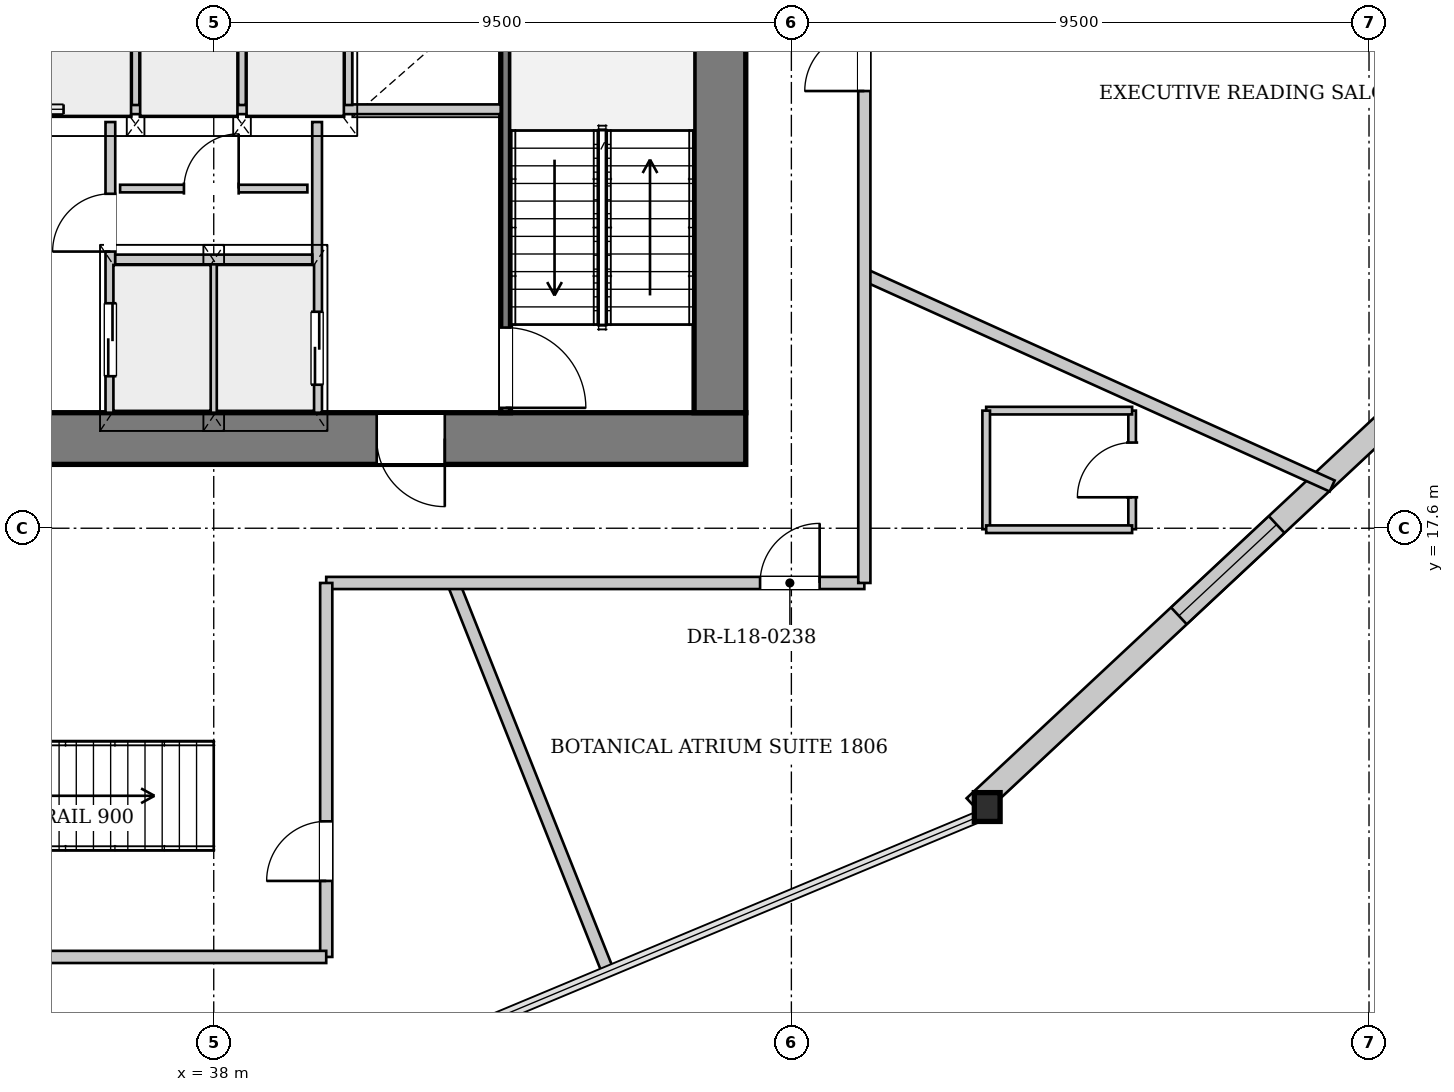
"""IFC4 building model, lengths in metres.
Left out: names, types, materials, properties, quantities, classifications, styles, units other than length and angle.
Written with IfcOpenShell. Run it as: python <this file> out.ifc"""

import sys

from ifc_helpers import new_model, si_unit, direction, frame, frame_2d, origin, origin_2d, place, context, subcontext, project, spatial, rectangle, i_section, extrude, source, transform, mapped, element, fill, save


model = new_model("IFC4")
c1 = context("Model", 3, precision=1e-05, world=origin(), true_north=direction((0.0, 1.0)))
c2 = subcontext(c1, "Body", "Model", "MODEL_VIEW")
j1 = project(units=[si_unit("LENGTHUNIT", "METRE"), si_unit("PLANEANGLEUNIT", "RADIAN")], contexts=[c1])
p1 = place(None, origin())
s1 = spatial("IfcSite", under=j1, at=p1, CompositionType="ELEMENT")
p2 = place(p1, origin())
s2 = spatial("IfcBuilding", under=s1, at=p2, CompositionType="ELEMENT")
p3 = place(p2, frame((0.0, 0.0, 71.9)))
s3 = spatial("IfcBuildingStorey", under=s2, at=p3, CompositionType="ELEMENT", Elevation=71.9)
m1 = source(origin(), c2, "Body", "SweptSolid", [
    extrude(i_section(OverallWidth=0.424, OverallDepth=0.474, WebThickness=0.043, FlangeThickness=0.068, at=origin_2d()), origin(), (0.0, 0.0, 1.0), 3.848),
])
p4 = place(p3, frame((50.641, 12.882, 0.0), z_axis=(0.041559344662, 0.069350173611, 0.996726328684), x_axis=(-0.857769784319, 0.514034042753, 0.0)))
e1 = element("IfcColumn", 1, at=p4, inside=s3, PredefinedType="COLUMN", context=c2, shape_type="MappedRepresentation", body=[
    mapped(m1, transform((0.0, 0.0, 0.0), x_axis=(1.0, 0.0, 0.0), y_axis=(0.0, 1.0, 0.0), z_axis=(0.0, 0.0, 1.0), scale=1.0)),
])
p5 = place(p3, frame((68.261, 29.594, 0.0), z_axis=(0.0, 0.0, 1.0), x_axis=(-0.730910825088, -0.682472978051, 0.0)))
e2 = element("IfcWall", 2, at=p5, inside=s3, PredefinedType="SOLIDWALL", context=c2, shape_type="SweptSolid", body=[
    extrude(rectangle(XDim=24.284, YDim=0.38, at=frame_2d((12.142, 0.0))), origin(), (0.0, 0.0, 1.0), 3.042),
])
p6 = place(p5, frame((5.7, 0.0, 0.65)))
e3 = element("IfcOpeningElement", 3, at=p6, cuts=e2, PredefinedType="OPENING", context=c2, shape_type="SweptSolid", body=[
    extrude(rectangle(XDim=2.2, YDim=2.25, at=frame_2d((1.1, 1.125))), frame((0.0, 0.2, 0.0), z_axis=(0.0, -1.0, 0.0), x_axis=(1.0, 0.0, 0.0)), (0.0, 0.0, 1.0), 0.4),
])
p7 = place(p5, frame((17.485, 0.0, 0.65)))
e4 = element("IfcOpeningElement", 4, at=p7, cuts=e2, PredefinedType="OPENING", context=c2, shape_type="SweptSolid", body=[
    extrude(rectangle(XDim=2.2, YDim=2.25, at=frame_2d((1.1, 1.125))), frame((0.0, 0.2, 0.0), z_axis=(0.0, -1.0, 0.0), x_axis=(1.0, 0.0, 0.0)), (0.0, 0.0, 1.0), 0.4),
])
p8 = place(p3, frame((46.75, 19.075, 0.0), z_axis=(0.0, 0.0, 1.0), x_axis=(-1.0, 0.0, 0.0)))
e5 = element("IfcWall", 5, at=p8, inside=s3, PredefinedType="SHEAR", context=c2, shape_type="SweptSolid", body=[
    extrude(rectangle(XDim=17.5, YDim=0.85, at=frame_2d((8.75, 0.0))), origin(), (0.0, 0.0, 1.0), 3.75),
])
p9 = place(p8, frame((4.95, 0.0, 0.0)))
e6 = element("IfcOpeningElement", 6, at=p9, cuts=e5, PredefinedType="OPENING", context=c2, shape_type="SweptSolid", body=[
    extrude(rectangle(XDim=1.12, YDim=2.25, at=frame_2d((0.56, 1.125))), frame((0.0, 0.435, 0.0), z_axis=(0.0, -1.0, 0.0), x_axis=(1.0, 0.0, 0.0)), (0.0, 0.0, 1.0), 0.87),
])
p10 = place(p8, frame((11.45, 0.0, 0.0)))
e7 = element("IfcOpeningElement", 7, at=p10, cuts=e5, PredefinedType="OPENING", context=c2, shape_type="SweptSolid", body=[
    extrude(rectangle(XDim=1.12, YDim=2.25, at=frame_2d((0.56, 1.125))), frame((0.0, 0.435, 0.0), z_axis=(0.0, -1.0, 0.0), x_axis=(1.0, 0.0, 0.0)), (0.0, 0.0, 1.0), 0.87),
])
p11 = place(p3, frame((46.325, 33.7, 0.0), z_axis=(0.0, 0.0, 1.0), x_axis=(0.0, -1.0, 0.0)))
e8 = element("IfcWall", 8, at=p11, inside=s3, PredefinedType="SHEAR", context=c2, shape_type="SweptSolid", body=[
    extrude(rectangle(XDim=14.2, YDim=0.85, at=frame_2d((7.1, 0.0))), origin(), (0.0, 0.0, 1.0), 3.75),
])
p12 = place(p11, frame((5.18, 0.0, 0.0)))
e9 = element("IfcOpeningElement", 9, at=p12, cuts=e8, PredefinedType="OPENING", context=c2, shape_type="SweptSolid", body=[
    extrude(rectangle(XDim=1.6, YDim=2.2, at=frame_2d((0.8, 1.1))), frame((0.0, 0.435, 0.0), z_axis=(0.0, -1.0, 0.0), x_axis=(1.0, 0.0, 0.0)), (0.0, 0.0, 1.0), 0.87),
])
p13 = place(p3, frame((42.8, 26.96, 0.0), z_axis=(0.0, 0.0, 1.0), x_axis=(0.0, -1.0, 0.0)))
e10 = element("IfcWall", 10, at=p13, inside=s3, PredefinedType="PARTITIONING", context=c2, shape_type="SweptSolid", body=[
    extrude(rectangle(XDim=7.46, YDim=0.16, at=frame_2d((3.73, 0.0))), origin(), (0.0, 0.0, 1.0), 3.75),
])
p14 = place(p13, frame((6.06, 0.0, 0.0)))
e11 = element("IfcOpeningElement", 11, at=p14, cuts=e10, PredefinedType="OPENING", context=c2, shape_type="SweptSolid", body=[
    extrude(rectangle(XDim=1.32, YDim=2.2, at=frame_2d((0.66, 1.1))), frame((0.0, 0.09, 0.0), z_axis=(0.0, -1.0, 0.0), x_axis=(1.0, 0.0, 0.0)), (0.0, 0.0, 1.0), 0.18),
])
p15 = place(p3, frame((36.3, 19.5, 0.0), z_axis=(0.0, 0.0, 1.0), x_axis=(0.0, 1.0, 0.0)))
e12 = element("IfcWall", 12, at=p15, inside=s3, PredefinedType="PARTITIONING", context=c2, shape_type="SweptSolid", body=[
    extrude(rectangle(XDim=4.78, YDim=0.16, at=frame_2d((2.39, 0.0))), origin(), (0.0, 0.0, 1.0), 3.75),
])
p16 = place(p15, frame((0.6, 0.0, 0.0)))
e13 = element("IfcOpeningElement", 13, at=p16, cuts=e12, PredefinedType="OPENING", context=c2, shape_type="SweptSolid", body=[
    extrude(rectangle(XDim=1.2, YDim=2.2, at=frame_2d((0.6, 1.1))), frame((0.0, 0.09, 0.0), z_axis=(0.0, -1.0, 0.0), x_axis=(1.0, 0.0, 0.0)), (0.0, 0.0, 1.0), 0.18),
])
p17 = place(p15, frame((2.65, 0.0, 0.0)))
e14 = element("IfcOpeningElement", 14, at=p17, cuts=e12, PredefinedType="OPENING", context=c2, shape_type="SweptSolid", body=[
    extrude(rectangle(XDim=0.95, YDim=2.1, at=frame_2d((0.475, 1.05))), frame((0.0, 0.09, 0.0), z_axis=(0.0, -1.0, 0.0), x_axis=(1.0, 0.0, 0.0)), (0.0, 0.0, 1.0), 0.18),
])
p18 = place(p3, frame((39.7, 24.28, 0.0), z_axis=(0.0, 0.0, 1.0), x_axis=(0.0, -1.0, 0.0)))
e15 = element("IfcWall", 15, at=p18, inside=s3, PredefinedType="PARTITIONING", context=c2, shape_type="SweptSolid", body=[
    extrude(rectangle(XDim=4.78, YDim=0.16, at=frame_2d((2.39, 0.0))), origin(), (0.0, 0.0, 1.0), 3.75),
])
p19 = place(p18, frame((3.12, 0.0, 0.0)))
e16 = element("IfcOpeningElement", 16, at=p19, cuts=e15, PredefinedType="OPENING", context=c2, shape_type="SweptSolid", body=[
    extrude(rectangle(XDim=1.2, YDim=2.2, at=frame_2d((0.6, 1.1))), frame((0.0, 0.09, 0.0), z_axis=(0.0, -1.0, 0.0), x_axis=(1.0, 0.0, 0.0)), (0.0, 0.0, 1.0), 0.18),
])
p20 = place(p3, frame((38.0, 19.5, 0.0), z_axis=(0.0, 0.0, 1.0), x_axis=(0.0, 1.0, 0.0)))
e17 = element("IfcWall", 17, at=p20, inside=s3, PredefinedType="PARTITIONING", context=c2, shape_type="SweptSolid", body=[
    extrude(rectangle(XDim=2.46, YDim=0.125, at=frame_2d((1.23, 0.0))), origin(), (0.0, 0.0, 1.0), 3.75),
])
p21 = place(p3, frame((36.38, 22.02, 0.0), z_axis=(0.0, 0.0, 1.0), x_axis=(1.0, 0.0, 0.0)))
e18 = element("IfcWall", 18, at=p21, inside=s3, PredefinedType="PARTITIONING", context=c2, shape_type="SweptSolid", body=[
    extrude(rectangle(XDim=3.24, YDim=0.16, at=frame_2d((1.62, 0.0))), origin(), (0.0, 0.0, 1.0), 3.75),
])
p22 = place(p3, frame((33.28, 24.49, 0.0), z_axis=(0.0, 0.0, 1.0), x_axis=(1.0, 0.0, 0.0)))
e19 = element("IfcWall", 19, at=p22, inside=s3, PredefinedType="PARTITIONING", context=c2, shape_type="SweptSolid", body=[
    extrude(rectangle(XDim=9.44, YDim=0.16, at=frame_2d((4.72, 0.0))), origin(), (0.0, 0.0, 1.0), 3.75),
])
p23 = place(p22, frame((0.85, 0.0, 0.95)))
e20 = element("IfcOpeningElement", 20, at=p23, cuts=e19, PredefinedType="OPENING", context=c2, shape_type="SweptSolid", body=[
    extrude(rectangle(XDim=1.4, YDim=1.8, at=frame_2d((0.7, 0.9))), frame((0.0, 0.09, 0.0), z_axis=(0.0, -1.0, 0.0), x_axis=(1.0, 0.0, 0.0)), (0.0, 0.0, 1.0), 0.18),
])
p24 = place(p3, frame((36.46, 23.186, 0.0), z_axis=(0.0, 0.0, 1.0), x_axis=(1.0, 0.0, 0.0)))
e21 = element("IfcWall", 21, at=p24, inside=s3, PredefinedType="PARTITIONING", context=c2, shape_type="SweptSolid", body=[
    extrude(rectangle(XDim=3.08, YDim=0.125, at=frame_2d((1.54, 0.0))), origin(), (0.0, 0.0, 1.0), 3.75),
])
p25 = place(p24, frame((1.05, 0.0, 0.0)))
e22 = element("IfcOpeningElement", 22, at=p25, cuts=e21, PredefinedType="OPENING", context=c2, shape_type="SweptSolid", body=[
    extrude(rectangle(XDim=0.9, YDim=2.1, at=frame_2d((0.45, 1.05))), frame((0.0, 0.073, 0.0), z_axis=(0.0, -1.0, 0.0), x_axis=(1.0, 0.0, 0.0)), (0.0, 0.0, 1.0), 0.145),
])
for number, where, z_axis, x_axis in (
    (23, (36.715, 24.56, 0.0), (0.0, 0.0, 1.0), (0.0, 1.0, 0.0)),
    (24, (38.465, 24.56, 0.0), (0.0, 0.0, 1.0), (0.0, 1.0, 0.0)),
    (25, (40.215, 24.56, 0.0), (0.0, 0.0, 1.0), (0.0, 1.0, 0.0)),
):
    element("IfcWall", number, at=place(p3, frame(where, z_axis=z_axis, x_axis=x_axis)), inside=s3, PredefinedType="PARTITIONING", context=c2, shape_type="SweptSolid", body=[
        extrude(rectangle(XDim=2.31, YDim=0.125, at=frame_2d((1.155, 0.0))), origin(), (0.0, 0.0, 1.0), 3.75),
    ])
p26 = place(p3, frame((41.94, 16.7, 0.0), z_axis=(0.0, 0.0, 1.0), x_axis=(0.369724051114, -0.929141607091, 0.0)))
e26 = element("IfcWall", 26, at=p26, inside=s3, PredefinedType="PARTITIONING", context=c2, shape_type="SweptSolid", body=[
    extrude(rectangle(XDim=6.847, YDim=0.2, at=frame_2d((3.423, 0.0))), origin(), (0.0, 0.0, 1.0), 3.75),
])
p27 = place(p3, frame((48.7, 21.769, 0.0), z_axis=(0.0, 0.0, 1.0), x_axis=(0.911403489645, -0.41151388684, 0.0)))
e27 = element("IfcWall", 27, at=p27, inside=s3, PredefinedType="PARTITIONING", context=c2, shape_type="SweptSolid", body=[
    extrude(rectangle(XDim=8.442, YDim=0.2, at=frame_2d((4.221, 0.0))), origin(), (0.0, 0.0, 1.0), 3.75),
])
p28 = place(p3, frame((53.104, 17.584, 0.0), z_axis=(0.0, 0.0, 1.0), x_axis=(0.0, 1.0, 0.0)))
e28 = element("IfcWall", 28, at=p28, inside=s3, PredefinedType="PARTITIONING", context=c2, shape_type="SweptSolid", body=[
    extrude(rectangle(XDim=1.95, YDim=0.125, at=frame_2d((0.975, 0.0))), origin(), (0.0, 0.0, 1.0), 3.75),
])
p29 = place(p28, frame((0.525, 0.0, 0.0)))
e29 = element("IfcOpeningElement", 29, at=p29, cuts=e28, PredefinedType="OPENING", context=c2, shape_type="SweptSolid", body=[
    extrude(rectangle(XDim=0.9, YDim=2.1, at=frame_2d((0.45, 1.05))), frame((0.0, 0.073, 0.0), z_axis=(0.0, -1.0, 0.0), x_axis=(1.0, 0.0, 0.0)), (0.0, 0.0, 1.0), 0.145),
])
p30 = place(p3, frame((53.104, 19.534, 0.0), z_axis=(0.0, 0.0, 1.0), x_axis=(-1.0, 0.0, 0.0)))
e30 = element("IfcWall", 30, at=p30, inside=s3, PredefinedType="PARTITIONING", context=c2, shape_type="SweptSolid", body=[
    extrude(rectangle(XDim=2.4, YDim=0.125, at=frame_2d((1.2, 0.0))), origin(), (0.0, 0.0, 1.0), 3.75),
])
p31 = place(p3, frame((50.704, 19.534, 0.0), z_axis=(0.0, 0.0, 1.0), x_axis=(0.0, -1.0, 0.0)))
e31 = element("IfcWall", 31, at=p31, inside=s3, PredefinedType="PARTITIONING", context=c2, shape_type="SweptSolid", body=[
    extrude(rectangle(XDim=1.95, YDim=0.125, at=frame_2d((0.975, 0.0))), origin(), (0.0, 0.0, 1.0), 3.75),
])
p32 = place(p3, frame((50.704, 17.584, 0.0), z_axis=(0.0, 0.0, 1.0), x_axis=(1.0, 0.0, 0.0)))
e32 = element("IfcWall", 32, at=p32, inside=s3, PredefinedType="PARTITIONING", context=c2, shape_type="SweptSolid", body=[
    extrude(rectangle(XDim=2.4, YDim=0.125, at=frame_2d((1.2, 0.0))), origin(), (0.0, 0.0, 1.0), 3.75),
])
p33 = place(p3, frame((39.85, 16.7, 0.0), z_axis=(0.0, 0.0, 1.0), x_axis=(1.0, 0.0, 0.0)))
e33 = element("IfcWall", 33, at=p33, inside=s3, PredefinedType="PARTITIONING", context=c2, shape_type="SweptSolid", body=[
    extrude(rectangle(XDim=8.85, YDim=0.2, at=frame_2d((4.425, 0.0))), origin(), (0.0, 0.0, 1.0), 3.75),
])
p34 = place(p33, frame((7.135, 0.0, 0.0)))
e34 = element("IfcOpeningElement", 34, at=p34, cuts=e33, PredefinedType="OPENING", context=c2, shape_type="SweptSolid", body=[
    extrude(rectangle(XDim=0.98, YDim=2.15, at=frame_2d((0.49, 1.075))), frame((0.0, 0.11, 0.0), z_axis=(0.0, -1.0, 0.0), x_axis=(1.0, 0.0, 0.0)), (0.0, 0.0, 1.0), 0.22),
])
p35 = place(p3, frame((48.7, 16.7, 0.0), z_axis=(0.0, 0.0, 1.0), x_axis=(0.0, 1.0, 0.0)))
e35 = element("IfcWall", 35, at=p35, inside=s3, PredefinedType="PARTITIONING", context=c2, shape_type="SweptSolid", body=[
    extrude(rectangle(XDim=19.8, YDim=0.2, at=frame_2d((9.9, 0.0))), origin(), (0.0, 0.0, 1.0), 3.75),
])
p36 = place(p35, frame((8.09, 0.0, 0.0)))
e36 = element("IfcOpeningElement", 36, at=p36, cuts=e35, PredefinedType="OPENING", context=c2, shape_type="SweptSolid", body=[
    extrude(rectangle(XDim=0.98, YDim=2.15, at=frame_2d((0.49, 1.075))), frame((0.0, 0.11, 0.0), z_axis=(0.0, -1.0, 0.0), x_axis=(1.0, 0.0, 0.0)), (0.0, 0.0, 1.0), 0.22),
])
p37 = place(p3, frame((39.85, 10.55, 0.0), z_axis=(0.0, 0.0, 1.0), x_axis=(0.0, 1.0, 0.0)))
e37 = element("IfcWall", 37, at=p37, inside=s3, PredefinedType="PARTITIONING", context=c2, shape_type="SweptSolid", body=[
    extrude(rectangle(XDim=6.15, YDim=0.2, at=frame_2d((3.075, 0.0))), origin(), (0.0, 0.0, 1.0), 3.75),
])
p38 = place(p37, frame((1.25, 0.0, 0.0)))
e38 = element("IfcOpeningElement", 38, at=p38, cuts=e37, PredefinedType="OPENING", context=c2, shape_type="SweptSolid", body=[
    extrude(rectangle(XDim=0.98, YDim=2.15, at=frame_2d((0.49, 1.075))), frame((0.0, 0.11, 0.0), z_axis=(0.0, -1.0, 0.0), x_axis=(1.0, 0.0, 0.0)), (0.0, 0.0, 1.0), 0.22),
])
p39 = place(p3, frame((29.55, 10.55, 0.0), z_axis=(0.0, 0.0, 1.0), x_axis=(1.0, 0.0, 0.0)))
e39 = element("IfcWall", 39, at=p39, inside=s3, PredefinedType="PARTITIONING", context=c2, shape_type="SweptSolid", body=[
    extrude(rectangle(XDim=10.3, YDim=0.2, at=frame_2d((5.15, 0.0))), origin(), (0.0, 0.0, 1.0), 3.75),
])
m2 = source(origin(), c2, "Body", "SweptSolid", [
    extrude(rectangle(XDim=2.2, YDim=2.25, at=frame_2d((1.1, 1.125))), frame((0.0, 0.03, 0.0), z_axis=(0.0, -1.0, 0.0), x_axis=(1.0, 0.0, 0.0)), (0.0, 0.0, 1.0), 0.06),
])
p40 = place(p7, origin())
e40 = element("IfcWindow", 40, at=p40, inside=s3, PartitioningType="SINGLE_PANEL", PredefinedType="WINDOW", context=c2, shape_type="MappedRepresentation", body=[
    mapped(m2, transform((0.0, 0.0, 0.0), x_axis=(1.0, 0.0, 0.0), y_axis=(0.0, 1.0, 0.0), z_axis=(0.0, 0.0, 1.0), scale=1.0)),
])
fill(e4, e40)
m3 = source(origin(), c2, "Body", "SweptSolid", [
    extrude(rectangle(XDim=1.12, YDim=2.25, at=frame_2d((0.56, 1.125))), frame((0.0, 0.025, 0.0), z_axis=(0.0, -1.0, 0.0), x_axis=(1.0, 0.0, 0.0)), (0.0, 0.0, 1.0), 0.05),
])
p41 = place(p9, origin())
e41 = element("IfcDoor", 41, at=p41, inside=s3, OperationType="SINGLE_SWING_LEFT", PredefinedType="DOOR", context=c2, shape_type="MappedRepresentation", body=[
    mapped(m3, transform((0.0, 0.0, 0.0), x_axis=(1.0, 0.0, 0.0), y_axis=(0.0, 1.0, 0.0), z_axis=(0.0, 0.0, 1.0), scale=1.0)),
])
fill(e6, e41)
m4 = source(origin(), c2, "Body", "SweptSolid", [
    extrude(rectangle(XDim=1.32, YDim=2.2, at=frame_2d((0.66, 1.1))), frame((0.0, 0.025, 0.0), z_axis=(0.0, -1.0, 0.0), x_axis=(1.0, 0.0, 0.0)), (0.0, 0.0, 1.0), 0.05),
])
p42 = place(p14, origin())
e42 = element("IfcDoor", 42, at=p42, inside=s3, OperationType="SINGLE_SWING_RIGHT", PredefinedType="DOOR", context=c2, shape_type="MappedRepresentation", body=[
    mapped(m4, transform((0.0, 0.0, 0.0), x_axis=(1.0, 0.0, 0.0), y_axis=(0.0, 1.0, 0.0), z_axis=(0.0, 0.0, 1.0), scale=1.0)),
])
fill(e11, e42)
m5 = source(origin(), c2, "Body", "SweptSolid", [
    extrude(rectangle(XDim=1.2, YDim=2.2, at=frame_2d((0.6, 1.1))), frame((0.0, 0.025, 0.0), z_axis=(0.0, -1.0, 0.0), x_axis=(1.0, 0.0, 0.0)), (0.0, 0.0, 1.0), 0.05),
])
p43 = place(p16, origin())
e43 = element("IfcDoor", 43, at=p43, inside=s3, OperationType="DOUBLE_DOOR_SLIDING", PredefinedType="DOOR", context=c2, shape_type="MappedRepresentation", body=[
    mapped(m5, transform((0.0, 0.0, 0.0), x_axis=(1.0, 0.0, 0.0), y_axis=(0.0, 1.0, 0.0), z_axis=(0.0, 0.0, 1.0), scale=1.0)),
])
fill(e13, e43)
m6 = source(origin(), c2, "Body", "SweptSolid", [
    extrude(rectangle(XDim=0.95, YDim=2.1, at=frame_2d((0.475, 1.05))), frame((0.0, 0.025, 0.0), z_axis=(0.0, -1.0, 0.0), x_axis=(1.0, 0.0, 0.0)), (0.0, 0.0, 1.0), 0.05),
])
p44 = place(p17, origin())
e44 = element("IfcDoor", 44, at=p44, inside=s3, OperationType="SINGLE_SWING_LEFT", PredefinedType="DOOR", context=c2, shape_type="MappedRepresentation", body=[
    mapped(m6, transform((0.0, 0.0, 0.0), x_axis=(1.0, 0.0, 0.0), y_axis=(0.0, 1.0, 0.0), z_axis=(0.0, 0.0, 1.0), scale=1.0)),
])
fill(e14, e44)
m7 = source(origin(), c2, "Body", "SweptSolid", [
    extrude(rectangle(XDim=0.9, YDim=2.1, at=frame_2d((0.45, 1.05))), frame((0.0, 0.025, 0.0), z_axis=(0.0, -1.0, 0.0), x_axis=(1.0, 0.0, 0.0)), (0.0, 0.0, 1.0), 0.05),
])
p45 = place(p25, origin())
e45 = element("IfcDoor", 45, at=p45, inside=s3, OperationType="SINGLE_SWING_RIGHT", PredefinedType="DOOR", context=c2, shape_type="MappedRepresentation", body=[
    mapped(m7, transform((0.0, 0.0, 0.0), x_axis=(1.0, 0.0, 0.0), y_axis=(0.0, 1.0, 0.0), z_axis=(0.0, 0.0, 1.0), scale=1.0)),
])
fill(e22, e45)
p46 = place(p19, origin())
e46 = element("IfcDoor", 46, at=p46, inside=s3, OperationType="DOUBLE_DOOR_SLIDING", PredefinedType="DOOR", context=c2, shape_type="MappedRepresentation", body=[
    mapped(m5, transform((0.0, 0.0, 0.0), x_axis=(1.0, 0.0, 0.0), y_axis=(0.0, 1.0, 0.0), z_axis=(0.0, 0.0, 1.0), scale=1.0)),
])
fill(e16, e46)
p47 = place(p29, origin())
e47 = element("IfcDoor", 47, at=p47, inside=s3, OperationType="SINGLE_SWING_LEFT", PredefinedType="DOOR", context=c2, shape_type="MappedRepresentation", body=[
    mapped(m7, transform((0.0, 0.0, 0.0), x_axis=(1.0, 0.0, 0.0), y_axis=(0.0, 1.0, 0.0), z_axis=(0.0, 0.0, 1.0), scale=1.0)),
])
fill(e29, e47)
m8 = source(origin(), c2, "Body", "SweptSolid", [
    extrude(rectangle(XDim=0.98, YDim=2.15, at=frame_2d((0.49, 1.075))), frame((0.0, 0.025, 0.0), z_axis=(0.0, -1.0, 0.0), x_axis=(1.0, 0.0, 0.0)), (0.0, 0.0, 1.0), 0.05),
])
p48 = place(p34, origin())
e48 = element("IfcDoor", 48, at=p48, inside=s3, OperationType="SINGLE_SWING_RIGHT", PredefinedType="DOOR", context=c2, shape_type="MappedRepresentation", body=[
    mapped(m8, transform((0.0, 0.0, 0.0), x_axis=(1.0, 0.0, 0.0), y_axis=(0.0, 1.0, 0.0), z_axis=(0.0, 0.0, 1.0), scale=1.0)),
])
fill(e34, e48)
p49 = place(p36, origin())
e49 = element("IfcDoor", 49, at=p49, inside=s3, OperationType="SINGLE_SWING_LEFT", PredefinedType="DOOR", context=c2, shape_type="MappedRepresentation", body=[
    mapped(m8, transform((0.0, 0.0, 0.0), x_axis=(1.0, 0.0, 0.0), y_axis=(0.0, 1.0, 0.0), z_axis=(0.0, 0.0, 1.0), scale=1.0)),
])
fill(e36, e49)
p50 = place(p38, origin())
e50 = element("IfcDoor", 50, at=p50, inside=s3, OperationType="SINGLE_SWING_LEFT", PredefinedType="DOOR", context=c2, shape_type="MappedRepresentation", body=[
    mapped(m8, transform((0.0, 0.0, 0.0), x_axis=(1.0, 0.0, 0.0), y_axis=(0.0, 1.0, 0.0), z_axis=(0.0, 0.0, 1.0), scale=1.0)),
])
fill(e38, e50)
m9 = source(origin(), c2, "Body", "SweptSolid", [
    extrude(rectangle(XDim=1.4, YDim=1.8, at=frame_2d((0.7, 0.9))), frame((0.0, 0.03, 0.0), z_axis=(0.0, -1.0, 0.0), x_axis=(1.0, 0.0, 0.0)), (0.0, 0.0, 1.0), 0.06),
])
p51 = place(p23, origin())
e51 = element("IfcWindow", 51, at=p51, inside=s3, PartitioningType="SINGLE_PANEL", PredefinedType="WINDOW", context=c2, shape_type="MappedRepresentation", body=[
    mapped(m9, transform((0.0, 0.0, 0.0), x_axis=(1.0, 0.0, 0.0), y_axis=(0.0, 1.0, 0.0), z_axis=(0.0, 0.0, 1.0), scale=1.0)),
])
fill(e20, e51)
save(model, sys.argv[1])
